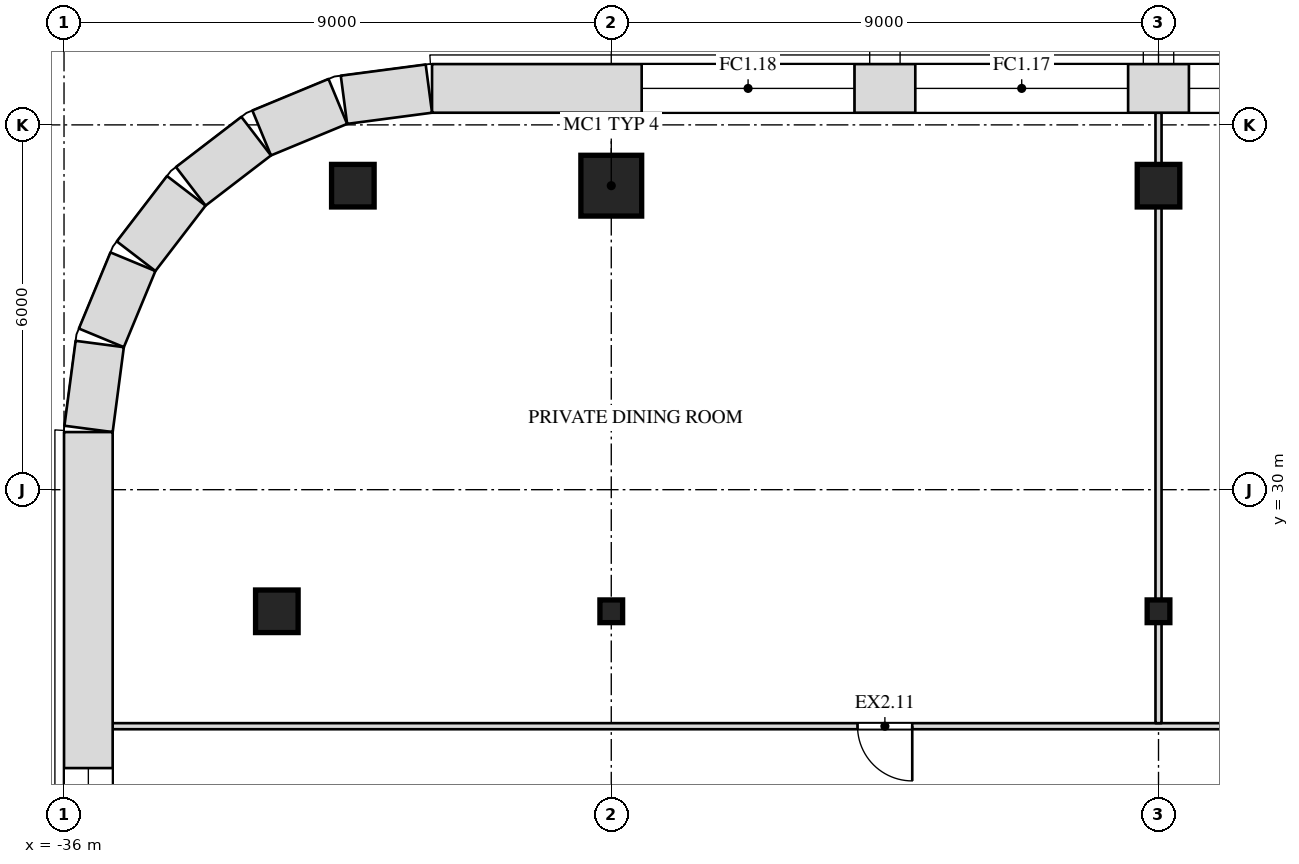
"""IFC4 building model, lengths in metres.
Left out: names, types, materials, properties, quantities, classifications, styles, units other than length and angle.
Written with IfcOpenShell. Run it as: python <this file> out.ifc"""

import sys

from ifc_helpers import new_model, si_unit, direction, frame, frame_2d, origin, origin_2d, place, context, subcontext, project, spatial, rectangle, i_section, extrude, element, fill, save


model = new_model("IFC4")
c1 = context("Model", 3, precision=1e-05, world=origin(), true_north=direction((0.0, 1.0)))
c2 = subcontext(c1, "Body", "Model", "MODEL_VIEW")
j1 = project(units=[si_unit("LENGTHUNIT", "METRE"), si_unit("PLANEANGLEUNIT", "RADIAN")], contexts=[c1])
p1 = place(None, origin())
s1 = spatial("IfcSite", under=j1, at=p1, CompositionType="ELEMENT")
p2 = place(p1, origin())
s2 = spatial("IfcBuilding", under=s1, at=p2, CompositionType="ELEMENT")
p3 = place(p2, frame((0.0, 0.0, 276.5)))
s3 = spatial("IfcBuildingStorey", under=s2, at=p3, CompositionType="ELEMENT", Elevation=276.5)
p4 = place(p3, frame((-32.5, 28.0, 0.0), z_axis=(0.0, 0.0, 1.0), x_axis=(1.0, 0.0, 0.0)))
e1 = element("IfcColumn", 1, at=p4, inside=s3, PredefinedType="COLUMN", context=c2, shape_type="SweptSolid", body=[
    extrude(rectangle(XDim=0.7, YDim=0.7, at=origin_2d()), origin(), (0.0, 0.0, 1.0), 4.0),
])
for number, where, z_axis, x_axis in (
    (2, (-27.0, 28.0, 0.0), (0.0, 0.0, 1.0), (1.0, 0.0, 0.0)),
    (3, (-18.0, 28.0, 0.0), (0.0, 0.0, 1.0), (1.0, 0.0, 0.0)),
):
    element("IfcColumn", number, at=place(p3, frame(where, z_axis=z_axis, x_axis=x_axis)), inside=s3, PredefinedType="COLUMN", context=c2, shape_type="SweptSolid", body=[
        extrude(i_section(OverallWidth=0.373, OverallDepth=0.373, WebThickness=0.016, FlangeThickness=0.026, at=origin_2d()), origin(), (0.0, 0.0, 1.0), 4.0),
    ])
p5 = place(p3, frame((-31.25, 35.0, 0.0), z_axis=(0.0, 0.0, 1.0), x_axis=(1.0, 0.0, 0.0)))
e4 = element("IfcColumn", 4, at=p5, inside=s3, PredefinedType="COLUMN", context=c2, shape_type="SweptSolid", body=[
    extrude(rectangle(XDim=0.7, YDim=0.7, at=origin_2d()), origin(), (0.0, 0.0, 1.0), 4.0),
])
p6 = place(p3, frame((-27.0, 35.0, 0.0), z_axis=(0.0, 0.0, 1.0), x_axis=(1.0, 0.0, 0.0)))
e5 = element("IfcColumn", 5, at=p6, inside=s3, PredefinedType="COLUMN", context=c2, shape_type="SweptSolid", body=[
    extrude(rectangle(XDim=1.0, YDim=1.0, at=origin_2d()), origin(), (0.0, 0.0, 1.0), 4.0),
])
p7 = place(p3, frame((-18.0, 35.0, 0.0), z_axis=(0.0, 0.0, 1.0), x_axis=(1.0, 0.0, 0.0)))
e6 = element("IfcColumn", 6, at=p7, inside=s3, PredefinedType="COLUMN", context=c2, shape_type="SweptSolid", body=[
    extrude(rectangle(XDim=0.7, YDim=0.7, at=origin_2d()), origin(), (0.0, 0.0, 1.0), 4.0),
])
p8 = place(p3, frame((-35.2, 26.11, 0.0), z_axis=(0.0, 0.0, 1.0), x_axis=(1.0, 0.0, 0.0)))
e7 = element("IfcWall", 7, at=p8, inside=s3, PredefinedType="PARTITIONING", context=c2, shape_type="SweptSolid", body=[
    extrude(rectangle(XDim=70.4, YDim=0.1, at=frame_2d((35.2, 0.0))), origin(), (0.0, 0.0, 1.0), 3.78),
])
p9 = place(p8, frame((12.25, 0.0, 0.0)))
e8 = element("IfcOpeningElement", 8, at=p9, cuts=e7, PredefinedType="OPENING", context=c2, shape_type="SweptSolid", body=[
    extrude(rectangle(XDim=0.9, YDim=2.1, at=frame_2d((0.45, 1.05))), frame((0.0, 0.062, 0.0), z_axis=(0.0, -1.0, 0.0), x_axis=(1.0, 0.0, 0.0)), (0.0, 0.0, 1.0), 0.124),
])
p10 = place(p8, frame((21.25, 0.0, 0.0)))
e9 = element("IfcOpeningElement", 9, at=p10, cuts=e7, PredefinedType="OPENING", context=c2, shape_type="SweptSolid", body=[
    extrude(rectangle(XDim=0.9, YDim=2.1, at=frame_2d((0.45, 1.05))), frame((0.0, 0.062, 0.0), z_axis=(0.0, -1.0, 0.0), x_axis=(1.0, 0.0, 0.0)), (0.0, 0.0, 1.0), 0.124),
])
p11 = place(p8, frame((36.55, 0.0, 0.0)))
e10 = element("IfcOpeningElement", 10, at=p11, cuts=e7, PredefinedType="OPENING", context=c2, shape_type="SweptSolid", body=[
    extrude(rectangle(XDim=1.8, YDim=2.1, at=frame_2d((0.9, 1.05))), frame((0.0, 0.062, 0.0), z_axis=(0.0, -1.0, 0.0), x_axis=(1.0, 0.0, 0.0)), (0.0, 0.0, 1.0), 0.124),
])
p12 = place(p8, frame((52.75, 0.0, 0.0)))
e11 = element("IfcOpeningElement", 11, at=p12, cuts=e7, PredefinedType="OPENING", context=c2, shape_type="SweptSolid", body=[
    extrude(rectangle(XDim=0.9, YDim=2.1, at=frame_2d((0.45, 1.05))), frame((0.0, 0.062, 0.0), z_axis=(0.0, -1.0, 0.0), x_axis=(1.0, 0.0, 0.0)), (0.0, 0.0, 1.0), 0.124),
])
p13 = place(p8, frame((59.5, 0.0, 0.0)))
e12 = element("IfcOpeningElement", 12, at=p13, cuts=e7, PredefinedType="OPENING", context=c2, shape_type="SweptSolid", body=[
    extrude(rectangle(XDim=0.9, YDim=2.1, at=frame_2d((0.45, 1.05))), frame((0.0, 0.062, 0.0), z_axis=(0.0, -1.0, 0.0), x_axis=(1.0, 0.0, 0.0)), (0.0, 0.0, 1.0), 0.124),
])
p14 = place(p3, frame((-18.0, 26.16, 0.0), z_axis=(0.0, 0.0, 1.0), x_axis=(0.0, 1.0, 0.0)))
e13 = element("IfcWall", 13, at=p14, inside=s3, PredefinedType="PARTITIONING", context=c2, shape_type="SweptSolid", body=[
    extrude(rectangle(XDim=1.653, YDim=0.1, at=frame_2d((0.827, 0.0))), origin(), (0.0, 0.0, 1.0), 3.247),
])
p15 = place(p3, frame((-18.0, 28.187, 0.0), z_axis=(0.0, 0.0, 1.0), x_axis=(0.0, 1.0, 0.0)))
e14 = element("IfcWall", 14, at=p15, inside=s3, PredefinedType="PARTITIONING", context=c2, shape_type="SweptSolid", body=[
    extrude(rectangle(XDim=6.463, YDim=0.1, at=frame_2d((3.231, 0.0))), origin(), (0.0, 0.0, 1.0), 3.247),
])
p16 = place(p3, frame((-18.0, 35.35, 0.0), z_axis=(0.0, 0.0, 1.0), x_axis=(0.0, 1.0, 0.0)))
e15 = element("IfcWall", 15, at=p16, inside=s3, PredefinedType="PARTITIONING", context=c2, shape_type="SweptSolid", body=[
    extrude(rectangle(XDim=0.85, YDim=0.1, at=frame_2d((0.425, 0.0))), origin(), (0.0, 0.0, 1.0), 3.78),
])
p17 = place(p3, frame((29.948, 36.6, 0.0), z_axis=(0.0, 0.0, 1.0), x_axis=(-1.0, 0.0, 0.0)))
e16 = element("IfcWall", 16, at=p17, inside=s3, PredefinedType="SOLIDWALL", context=c2, shape_type="SweptSolid", body=[
    extrude(rectangle(XDim=59.895, YDim=0.8, at=frame_2d((29.948, 0.0))), origin(), (0.0, 0.0, 1.0), 3.78),
])
p18 = place(p17, frame((3.448, 0.0, 1.0)))
e17 = element("IfcOpeningElement", 17, at=p18, cuts=e16, PredefinedType="OPENING", context=c2, shape_type="SweptSolid", body=[
    extrude(rectangle(XDim=3.5, YDim=2.5, at=frame_2d((1.75, 1.25))), frame((0.0, 0.412, 0.0), z_axis=(0.0, -1.0, 0.0), x_axis=(1.0, 0.0, 0.0)), (0.0, 0.0, 1.0), 0.824),
])
p19 = place(p17, frame((7.948, 0.0, 1.0)))
e18 = element("IfcOpeningElement", 18, at=p19, cuts=e16, PredefinedType="OPENING", context=c2, shape_type="SweptSolid", body=[
    extrude(rectangle(XDim=3.5, YDim=2.5, at=frame_2d((1.75, 1.25))), frame((0.0, 0.412, 0.0), z_axis=(0.0, -1.0, 0.0), x_axis=(1.0, 0.0, 0.0)), (0.0, 0.0, 1.0), 0.824),
])
p20 = place(p17, frame((12.448, 0.0, 1.0)))
e19 = element("IfcOpeningElement", 19, at=p20, cuts=e16, PredefinedType="OPENING", context=c2, shape_type="SweptSolid", body=[
    extrude(rectangle(XDim=3.5, YDim=2.5, at=frame_2d((1.75, 1.25))), frame((0.0, 0.412, 0.0), z_axis=(0.0, -1.0, 0.0), x_axis=(1.0, 0.0, 0.0)), (0.0, 0.0, 1.0), 0.824),
])
p21 = place(p17, frame((16.948, 0.0, 1.0)))
e20 = element("IfcOpeningElement", 20, at=p21, cuts=e16, PredefinedType="OPENING", context=c2, shape_type="SweptSolid", body=[
    extrude(rectangle(XDim=3.5, YDim=2.5, at=frame_2d((1.75, 1.25))), frame((0.0, 0.412, 0.0), z_axis=(0.0, -1.0, 0.0), x_axis=(1.0, 0.0, 0.0)), (0.0, 0.0, 1.0), 0.824),
])
p22 = place(p17, frame((21.448, 0.0, 1.0)))
e21 = element("IfcOpeningElement", 21, at=p22, cuts=e16, PredefinedType="OPENING", context=c2, shape_type="SweptSolid", body=[
    extrude(rectangle(XDim=3.5, YDim=2.5, at=frame_2d((1.75, 1.25))), frame((0.0, 0.412, 0.0), z_axis=(0.0, -1.0, 0.0), x_axis=(1.0, 0.0, 0.0)), (0.0, 0.0, 1.0), 0.824),
])
p23 = place(p17, frame((25.948, 0.0, 1.0)))
e22 = element("IfcOpeningElement", 22, at=p23, cuts=e16, PredefinedType="OPENING", context=c2, shape_type="SweptSolid", body=[
    extrude(rectangle(XDim=3.5, YDim=2.5, at=frame_2d((1.75, 1.25))), frame((0.0, 0.412, 0.0), z_axis=(0.0, -1.0, 0.0), x_axis=(1.0, 0.0, 0.0)), (0.0, 0.0, 1.0), 0.824),
])
p24 = place(p17, frame((30.448, 0.0, 1.0)))
e23 = element("IfcOpeningElement", 23, at=p24, cuts=e16, PredefinedType="OPENING", context=c2, shape_type="SweptSolid", body=[
    extrude(rectangle(XDim=3.5, YDim=2.5, at=frame_2d((1.75, 1.25))), frame((0.0, 0.412, 0.0), z_axis=(0.0, -1.0, 0.0), x_axis=(1.0, 0.0, 0.0)), (0.0, 0.0, 1.0), 0.824),
])
p25 = place(p17, frame((34.948, 0.0, 1.0)))
e24 = element("IfcOpeningElement", 24, at=p25, cuts=e16, PredefinedType="OPENING", context=c2, shape_type="SweptSolid", body=[
    extrude(rectangle(XDim=3.5, YDim=2.5, at=frame_2d((1.75, 1.25))), frame((0.0, 0.412, 0.0), z_axis=(0.0, -1.0, 0.0), x_axis=(1.0, 0.0, 0.0)), (0.0, 0.0, 1.0), 0.824),
])
p26 = place(p17, frame((39.448, 0.0, 1.0)))
e25 = element("IfcOpeningElement", 25, at=p26, cuts=e16, PredefinedType="OPENING", context=c2, shape_type="SweptSolid", body=[
    extrude(rectangle(XDim=3.5, YDim=2.5, at=frame_2d((1.75, 1.25))), frame((0.0, 0.412, 0.0), z_axis=(0.0, -1.0, 0.0), x_axis=(1.0, 0.0, 0.0)), (0.0, 0.0, 1.0), 0.824),
])
p27 = place(p17, frame((43.948, 0.0, 1.0)))
e26 = element("IfcOpeningElement", 26, at=p27, cuts=e16, PredefinedType="OPENING", context=c2, shape_type="SweptSolid", body=[
    extrude(rectangle(XDim=3.5, YDim=2.5, at=frame_2d((1.75, 1.25))), frame((0.0, 0.412, 0.0), z_axis=(0.0, -1.0, 0.0), x_axis=(1.0, 0.0, 0.0)), (0.0, 0.0, 1.0), 0.824),
])
p28 = place(p17, frame((48.448, 0.0, 1.0)))
e27 = element("IfcOpeningElement", 27, at=p28, cuts=e16, PredefinedType="OPENING", context=c2, shape_type="SweptSolid", body=[
    extrude(rectangle(XDim=3.5, YDim=2.5, at=frame_2d((1.75, 1.25))), frame((0.0, 0.412, 0.0), z_axis=(0.0, -1.0, 0.0), x_axis=(1.0, 0.0, 0.0)), (0.0, 0.0, 1.0), 0.824),
])
p29 = place(p17, frame((52.948, 0.0, 1.0)))
e28 = element("IfcOpeningElement", 28, at=p29, cuts=e16, PredefinedType="OPENING", context=c2, shape_type="SweptSolid", body=[
    extrude(rectangle(XDim=3.5, YDim=2.5, at=frame_2d((1.75, 1.25))), frame((0.0, 0.412, 0.0), z_axis=(0.0, -1.0, 0.0), x_axis=(1.0, 0.0, 0.0)), (0.0, 0.0, 1.0), 0.824),
])
p30 = place(p3, frame((-30.0, 36.597, 0.0), z_axis=(0.0, 0.0, 1.0), x_axis=(-0.99144603414, -0.130517283865, 0.0)))
e29 = element("IfcWall", 29, at=p30, inside=s3, PredefinedType="SOLIDWALL", context=c2, shape_type="SweptSolid", body=[
    extrude(rectangle(XDim=1.408, YDim=0.8, at=frame_2d((0.704, 0.0))), origin(), (0.0, 0.0, 1.0), 3.78),
])
p31 = place(p3, frame((-31.497, 36.386, 0.0), z_axis=(0.0, 0.0, 1.0), x_axis=(-0.923847774587, -0.38276009378, 0.0)))
e30 = element("IfcWall", 30, at=p31, inside=s3, PredefinedType="SOLIDWALL", context=c2, shape_type="SweptSolid", body=[
    extrude(rectangle(XDim=1.355, YDim=0.8, at=frame_2d((0.678, 0.0))), origin(), (0.0, 0.0, 1.0), 3.78),
])
for number, where, z_axis, x_axis in (
    (31, (-32.84, 35.815, 0.0), (0.0, 0.0, 1.0), (-0.793, -0.609, 0.0)),
    (32, (-33.989, 34.916, 0.0), (0.0, 0.0, 1.0), (-0.609, -0.793, 0.0)),
):
    element("IfcWall", number, at=place(p3, frame(where, z_axis=z_axis, x_axis=x_axis)), inside=s3, PredefinedType="SOLIDWALL", context=c2, shape_type="SweptSolid", body=[
        extrude(rectangle(XDim=1.356, YDim=0.8, at=frame_2d((0.678, 0.0))), origin(), (0.0, 0.0, 1.0), 3.78),
    ])
p32 = place(p3, frame((-34.867, 33.75, 0.0), z_axis=(0.0, 0.0, 1.0), x_axis=(-0.38276009378, -0.923847774587, 0.0)))
e33 = element("IfcWall", 33, at=p32, inside=s3, PredefinedType="SOLIDWALL", context=c2, shape_type="SweptSolid", body=[
    extrude(rectangle(XDim=1.355, YDim=0.8, at=frame_2d((0.678, 0.0))), origin(), (0.0, 0.0, 1.0), 3.78),
])
p33 = place(p3, frame((-35.413, 32.396, 0.0), z_axis=(0.0, 0.0, 1.0), x_axis=(-0.130517283865, -0.99144603414, 0.0)))
e34 = element("IfcWall", 34, at=p33, inside=s3, PredefinedType="SOLIDWALL", context=c2, shape_type="SweptSolid", body=[
    extrude(rectangle(XDim=1.408, YDim=0.8, at=frame_2d((0.704, 0.0))), origin(), (0.0, 0.0, 1.0), 3.78),
])
p34 = place(p3, frame((-35.6, 30.948, 0.0), z_axis=(0.0, 0.0, 1.0), x_axis=(0.0, -1.0, 0.0)))
e35 = element("IfcWall", 35, at=p34, inside=s3, PredefinedType="SOLIDWALL", context=c2, shape_type="SweptSolid", body=[
    extrude(rectangle(XDim=38.895, YDim=0.8, at=frame_2d((19.448, 0.0))), origin(), (0.0, 0.0, 1.0), 3.78),
])
p35 = place(p34, frame((5.526, 0.0, 1.0)))
e36 = element("IfcOpeningElement", 36, at=p35, cuts=e35, PredefinedType="OPENING", context=c2, shape_type="SweptSolid", body=[
    extrude(rectangle(XDim=3.5, YDim=2.5, at=frame_2d((1.75, 1.25))), frame((0.0, 0.412, 0.0), z_axis=(0.0, -1.0, 0.0), x_axis=(1.0, 0.0, 0.0)), (0.0, 0.0, 1.0), 0.824),
])
p36 = place(p34, frame((10.395, 0.0, 1.0)))
e37 = element("IfcOpeningElement", 37, at=p36, cuts=e35, PredefinedType="OPENING", context=c2, shape_type="SweptSolid", body=[
    extrude(rectangle(XDim=3.5, YDim=2.5, at=frame_2d((1.75, 1.25))), frame((0.0, 0.412, 0.0), z_axis=(0.0, -1.0, 0.0), x_axis=(1.0, 0.0, 0.0)), (0.0, 0.0, 1.0), 0.824),
])
p37 = place(p34, frame((15.263, 0.0, 1.0)))
e38 = element("IfcOpeningElement", 38, at=p37, cuts=e35, PredefinedType="OPENING", context=c2, shape_type="SweptSolid", body=[
    extrude(rectangle(XDim=3.5, YDim=2.5, at=frame_2d((1.75, 1.25))), frame((0.0, 0.412, 0.0), z_axis=(0.0, -1.0, 0.0), x_axis=(1.0, 0.0, 0.0)), (0.0, 0.0, 1.0), 0.824),
])
p38 = place(p34, frame((20.132, 0.0, 1.0)))
e39 = element("IfcOpeningElement", 39, at=p38, cuts=e35, PredefinedType="OPENING", context=c2, shape_type="SweptSolid", body=[
    extrude(rectangle(XDim=3.5, YDim=2.5, at=frame_2d((1.75, 1.25))), frame((0.0, 0.412, 0.0), z_axis=(0.0, -1.0, 0.0), x_axis=(1.0, 0.0, 0.0)), (0.0, 0.0, 1.0), 0.824),
])
p39 = place(p34, frame((25.0, 0.0, 1.0)))
e40 = element("IfcOpeningElement", 40, at=p39, cuts=e35, PredefinedType="OPENING", context=c2, shape_type="SweptSolid", body=[
    extrude(rectangle(XDim=3.5, YDim=2.5, at=frame_2d((1.75, 1.25))), frame((0.0, 0.412, 0.0), z_axis=(0.0, -1.0, 0.0), x_axis=(1.0, 0.0, 0.0)), (0.0, 0.0, 1.0), 0.824),
])
p40 = place(p34, frame((29.869, 0.0, 1.0)))
e41 = element("IfcOpeningElement", 41, at=p40, cuts=e35, PredefinedType="OPENING", context=c2, shape_type="SweptSolid", body=[
    extrude(rectangle(XDim=3.5, YDim=2.5, at=frame_2d((1.75, 1.25))), frame((0.0, 0.412, 0.0), z_axis=(0.0, -1.0, 0.0), x_axis=(1.0, 0.0, 0.0)), (0.0, 0.0, 1.0), 0.824),
])
p41 = place(p9, origin())
e42 = element("IfcDoor", 42, at=p41, inside=s3, OperationType="SINGLE_SWING_LEFT", PredefinedType="DOOR", context=c2, shape_type="SweptSolid", body=[
    extrude(rectangle(XDim=0.9, YDim=2.1, at=frame_2d((0.45, 1.05))), frame((0.0, 0.025, 0.0), z_axis=(0.0, -1.0, 0.0), x_axis=(1.0, 0.0, 0.0)), (0.0, 0.0, 1.0), 0.05),
])
fill(e8, e42)
p42 = place(p27, origin())
e43 = element("IfcWindow", 43, at=p42, inside=s3, PartitioningType="SINGLE_PANEL", PredefinedType="WINDOW", context=c2, shape_type="SweptSolid", body=[
    extrude(rectangle(XDim=3.5, YDim=2.5, at=frame_2d((1.75, 1.25))), frame((0.0, 0.03, 0.0), z_axis=(0.0, -1.0, 0.0), x_axis=(1.0, 0.0, 0.0)), (0.0, 0.0, 1.0), 0.06),
])
fill(e26, e43)
p43 = place(p28, origin())
e44 = element("IfcWindow", 44, at=p43, inside=s3, PartitioningType="SINGLE_PANEL", PredefinedType="WINDOW", context=c2, shape_type="SweptSolid", body=[
    extrude(rectangle(XDim=3.5, YDim=2.5, at=frame_2d((1.75, 1.25))), frame((0.0, 0.03, 0.0), z_axis=(0.0, -1.0, 0.0), x_axis=(1.0, 0.0, 0.0)), (0.0, 0.0, 1.0), 0.06),
])
fill(e27, e44)
p44 = place(p29, origin())
e45 = element("IfcWindow", 45, at=p44, inside=s3, PartitioningType="SINGLE_PANEL", PredefinedType="WINDOW", context=c2, shape_type="SweptSolid", body=[
    extrude(rectangle(XDim=3.5, YDim=2.5, at=frame_2d((1.75, 1.25))), frame((0.0, 0.03, 0.0), z_axis=(0.0, -1.0, 0.0), x_axis=(1.0, 0.0, 0.0)), (0.0, 0.0, 1.0), 0.06),
])
fill(e28, e45)
p45 = place(p35, origin())
e46 = element("IfcWindow", 46, at=p45, inside=s3, PartitioningType="SINGLE_PANEL", PredefinedType="WINDOW", context=c2, shape_type="SweptSolid", body=[
    extrude(rectangle(XDim=3.5, YDim=2.5, at=frame_2d((1.75, 1.25))), frame((0.0, 0.03, 0.0), z_axis=(0.0, -1.0, 0.0), x_axis=(1.0, 0.0, 0.0)), (0.0, 0.0, 1.0), 0.06),
])
fill(e36, e46)
save(model, sys.argv[1])
